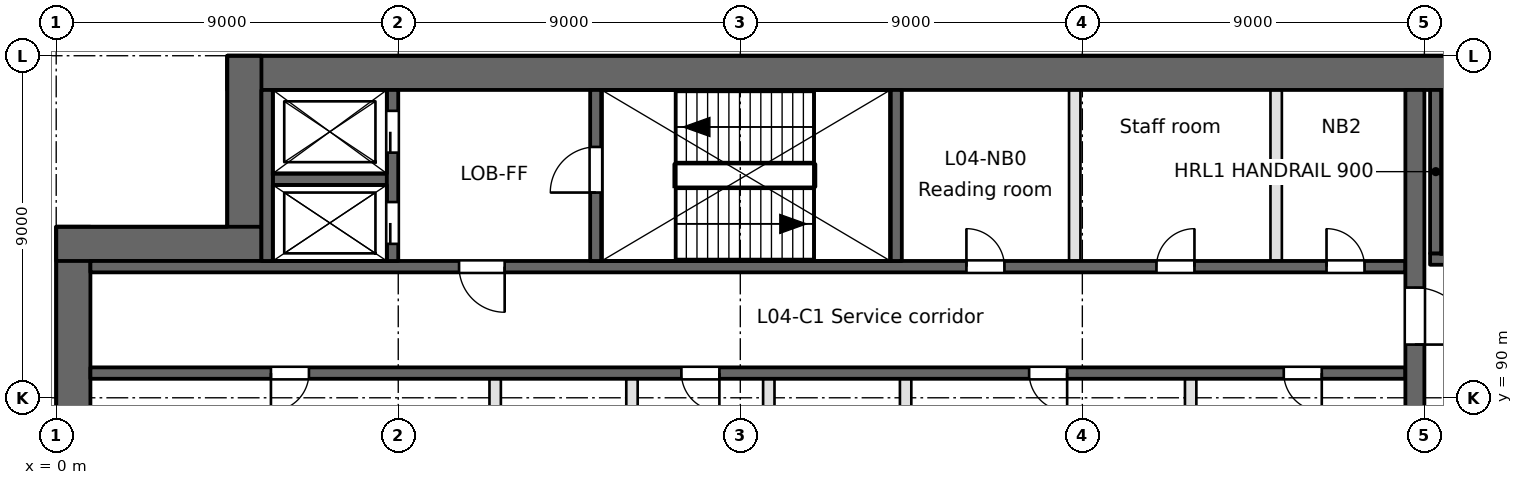
"""IFC4 building model, lengths in metres.
Left out: names, types, materials, properties, quantities, classifications, styles, units other than length and angle.
Written with IfcOpenShell. Run it as: python <this file> out.ifc"""

import sys

from ifc_helpers import new_model, si_unit, direction, frame, frame_2d, origin, place, context, subcontext, project, spatial, rectangle, extrude, element, fill, save


model = new_model("IFC4")
c1 = context("Model", 3, precision=1e-05, world=origin(), true_north=direction((0.0, 1.0)))
c2 = subcontext(c1, "Body", "Model", "MODEL_VIEW")
j1 = project(units=[si_unit("LENGTHUNIT", "METRE"), si_unit("PLANEANGLEUNIT", "RADIAN")], contexts=[c1])
p1 = place(None, origin())
s1 = spatial("IfcSite", under=j1, at=p1, CompositionType="ELEMENT")
p2 = place(p1, origin())
s2 = spatial("IfcBuilding", under=s1, at=p2, CompositionType="ELEMENT")
p3 = place(p2, frame((0.0, 0.0, 21.6)))
s3 = spatial("IfcBuildingStorey", under=s2, at=p3, CompositionType="ELEMENT", Elevation=21.6)
p4 = place(p3, frame((0.45, 94.5, 0.0), z_axis=(0.0, 0.0, 1.0), x_axis=(0.0, -1.0, 0.0)))
e1 = element("IfcWall", 1, at=p4, inside=s3, PredefinedType="SHEAR", context=c2, shape_type="SweptSolid", body=[
    extrude(rectangle(XDim=66.085, YDim=0.9, at=frame_2d((33.042, 0.0))), origin(), (0.0, 0.0, 1.0), 4.8),
])
p5 = place(p3, frame((94.5, 98.55, 0.0), z_axis=(0.0, 0.0, 1.0), x_axis=(-1.0, 0.0, 0.0)))
e2 = element("IfcWall", 2, at=p5, inside=s3, PredefinedType="SHEAR", context=c2, shape_type="SweptSolid", body=[
    extrude(rectangle(XDim=90.0, YDim=0.9, at=frame_2d((45.0, 0.0))), origin(), (0.0, 0.0, 1.0), 4.8),
])
for number, where, z_axis, x_axis in (
    (3, (4.95, 99.0, 0.0), (0.0, 0.0, 1.0), (0.0, -1.0, 0.0)),
    (4, (5.4, 94.05, 0.0), (0.0, 0.0, 1.0), (-1.0, 0.0, 0.0)),
):
    element("IfcWall", number, at=place(p3, frame(where, z_axis=z_axis, x_axis=x_axis)), inside=s3, PredefinedType="SHEAR", context=c2, shape_type="SweptSolid", body=[
        extrude(rectangle(XDim=5.4, YDim=0.9, at=frame_2d((2.7, 0.0))), origin(), (0.0, 0.0, 1.0), 4.8),
    ])
p6 = place(p3, frame((0.9, 90.65, -0.35), z_axis=(0.0, 0.0, 1.0), x_axis=(1.0, 0.0, 0.0)))
e5 = element("IfcWall", 5, at=p6, inside=s3, PredefinedType="SOLIDWALL", context=c2, shape_type="SweptSolid", body=[
    extrude(rectangle(XDim=34.6, YDim=0.3, at=frame_2d((17.3, 0.0))), origin(), (0.0, 0.0, 1.0), 4.8),
])
p7 = place(p6, frame((4.75, 0.0, 0.35)))
e6 = element("IfcOpeningElement", 6, at=p7, cuts=e5, PredefinedType="OPENING", context=c2, shape_type="SweptSolid", body=[
    extrude(rectangle(XDim=1.0, YDim=2.1, at=frame_2d((0.5, 1.05))), frame((0.0, 0.15, 0.0), z_axis=(0.0, -1.0, 0.0), x_axis=(1.0, 0.0, 0.0)), (0.0, 0.0, 1.0), 0.3),
])
p8 = place(p6, frame((24.7, 0.0, 0.35)))
e7 = element("IfcOpeningElement", 7, at=p8, cuts=e5, PredefinedType="OPENING", context=c2, shape_type="SweptSolid", body=[
    extrude(rectangle(XDim=1.0, YDim=2.1, at=frame_2d((0.5, 1.05))), frame((0.0, 0.15, 0.0), z_axis=(0.0, -1.0, 0.0), x_axis=(1.0, 0.0, 0.0)), (0.0, 0.0, 1.0), 0.3),
])
p9 = place(p6, frame((15.55, 0.0, 0.35)))
e8 = element("IfcOpeningElement", 8, at=p9, cuts=e5, PredefinedType="OPENING", context=c2, shape_type="SweptSolid", body=[
    extrude(rectangle(XDim=1.0, YDim=2.1, at=frame_2d((0.5, 1.05))), frame((0.0, 0.15, 0.0), z_axis=(0.0, -1.0, 0.0), x_axis=(1.0, 0.0, 0.0)), (0.0, 0.0, 1.0), 0.3),
])
p10 = place(p6, frame((31.4, 0.0, 0.35)))
e9 = element("IfcOpeningElement", 9, at=p10, cuts=e5, PredefinedType="OPENING", context=c2, shape_type="SweptSolid", body=[
    extrude(rectangle(XDim=1.0, YDim=2.1, at=frame_2d((0.5, 1.05))), frame((0.0, 0.15, 0.0), z_axis=(0.0, -1.0, 0.0), x_axis=(1.0, 0.0, 0.0)), (0.0, 0.0, 1.0), 0.3),
])
p11 = place(p3, frame((0.9, 93.45, -0.35), z_axis=(0.0, 0.0, 1.0), x_axis=(1.0, 0.0, 0.0)))
e10 = element("IfcWall", 10, at=p11, inside=s3, PredefinedType="SOLIDWALL", context=c2, shape_type="SweptSolid", body=[
    extrude(rectangle(XDim=34.6, YDim=0.3, at=frame_2d((17.3, 0.0))), origin(), (0.0, 0.0, 1.0), 4.8),
])
p12 = place(p11, frame((9.7, 0.0, 0.35)))
e11 = element("IfcOpeningElement", 11, at=p12, cuts=e10, PredefinedType="OPENING", context=c2, shape_type="SweptSolid", body=[
    extrude(rectangle(XDim=1.2, YDim=2.1, at=frame_2d((0.6, 1.05))), frame((0.0, 0.15, 0.0), z_axis=(0.0, -1.0, 0.0), x_axis=(1.0, 0.0, 0.0)), (0.0, 0.0, 1.0), 0.3),
])
p13 = place(p11, frame((23.05, 0.0, 0.35)))
e12 = element("IfcOpeningElement", 12, at=p13, cuts=e10, PredefinedType="OPENING", context=c2, shape_type="SweptSolid", body=[
    extrude(rectangle(XDim=1.0, YDim=2.1, at=frame_2d((0.5, 1.05))), frame((0.0, 0.15, 0.0), z_axis=(0.0, -1.0, 0.0), x_axis=(1.0, 0.0, 0.0)), (0.0, 0.0, 1.0), 0.3),
])
p14 = place(p11, frame((28.05, 0.0, 0.35)))
e13 = element("IfcOpeningElement", 13, at=p14, cuts=e10, PredefinedType="OPENING", context=c2, shape_type="SweptSolid", body=[
    extrude(rectangle(XDim=1.0, YDim=2.1, at=frame_2d((0.5, 1.05))), frame((0.0, 0.15, 0.0), z_axis=(0.0, -1.0, 0.0), x_axis=(1.0, 0.0, 0.0)), (0.0, 0.0, 1.0), 0.3),
])
p15 = place(p11, frame((32.525, 0.0, 0.35)))
e14 = element("IfcOpeningElement", 14, at=p15, cuts=e10, PredefinedType="OPENING", context=c2, shape_type="SweptSolid", body=[
    extrude(rectangle(XDim=1.0, YDim=2.1, at=frame_2d((0.5, 1.05))), frame((0.0, 0.15, 0.0), z_axis=(0.0, -1.0, 0.0), x_axis=(1.0, 0.0, 0.0)), (0.0, 0.0, 1.0), 0.3),
])
p16 = place(p3, frame((36.15, 93.65, -0.35), z_axis=(0.0, 0.0, 1.0), x_axis=(1.0, 0.0, 0.0)))
e15 = element("IfcWall", 15, at=p16, inside=s3, PredefinedType="SOLIDWALL", context=c2, shape_type="SweptSolid", body=[
    extrude(rectangle(XDim=8.2, YDim=0.3, at=frame_2d((4.1, 0.0))), origin(), (0.0, 0.0, 1.0), 4.8),
])
p17 = place(p16, frame((0.7, 0.0, 0.35)))
e16 = element("IfcOpeningElement", 16, at=p17, cuts=e15, PredefinedType="OPENING", context=c2, shape_type="SweptSolid", body=[
    extrude(rectangle(XDim=1.2, YDim=2.1, at=frame_2d((0.6, 1.05))), frame((0.0, 0.15, 0.0), z_axis=(0.0, -1.0, 0.0), x_axis=(1.0, 0.0, 0.0)), (0.0, 0.0, 1.0), 0.3),
])
p18 = place(p3, frame((5.7, 95.75, -0.35), z_axis=(0.0, 0.0, 1.0), x_axis=(1.0, 0.0, 0.0)))
e17 = element("IfcWall", 17, at=p18, inside=s3, PredefinedType="SOLIDWALL", context=c2, shape_type="SweptSolid", body=[
    extrude(rectangle(XDim=3.0, YDim=0.3, at=frame_2d((1.5, 0.0))), origin(), (0.0, 0.0, 1.0), 4.8),
])
p19 = place(p3, frame((5.55, 93.6, -0.35), z_axis=(0.0, 0.0, 1.0), x_axis=(0.0, 1.0, 0.0)))
e18 = element("IfcWall", 18, at=p19, inside=s3, PredefinedType="SOLIDWALL", context=c2, shape_type="SweptSolid", body=[
    extrude(rectangle(XDim=4.5, YDim=0.3, at=frame_2d((2.25, 0.0))), origin(), (0.0, 0.0, 1.0), 4.8),
])
p20 = place(p3, frame((8.85, 93.6, -0.35), z_axis=(0.0, 0.0, 1.0), x_axis=(0.0, 1.0, 0.0)))
e19 = element("IfcWall", 19, at=p20, inside=s3, PredefinedType="SOLIDWALL", context=c2, shape_type="SweptSolid", body=[
    extrude(rectangle(XDim=4.5, YDim=0.3, at=frame_2d((2.25, 0.0))), origin(), (0.0, 0.0, 1.0), 4.8),
])
p21 = place(p20, frame((0.45, 0.0, 0.35)))
e20 = element("IfcOpeningElement", 20, at=p21, cuts=e19, PredefinedType="OPENING", context=c2, shape_type="SweptSolid", body=[
    extrude(rectangle(XDim=1.1, YDim=2.1, at=frame_2d((0.55, 1.05))), frame((0.0, 0.15, 0.0), z_axis=(0.0, -1.0, 0.0), x_axis=(1.0, 0.0, 0.0)), (0.0, 0.0, 1.0), 0.3),
])
p22 = place(p20, frame((2.85, 0.0, 0.35)))
e21 = element("IfcOpeningElement", 21, at=p22, cuts=e19, PredefinedType="OPENING", context=c2, shape_type="SweptSolid", body=[
    extrude(rectangle(XDim=1.1, YDim=2.1, at=frame_2d((0.55, 1.05))), frame((0.0, 0.15, 0.0), z_axis=(0.0, -1.0, 0.0), x_axis=(1.0, 0.0, 0.0)), (0.0, 0.0, 1.0), 0.3),
])
p23 = place(p3, frame((11.55, 87.95, 0.0), z_axis=(0.0, 0.0, 1.0), x_axis=(0.0, 1.0, 0.0)))
e22 = element("IfcWall", 22, at=p23, inside=s3, PredefinedType="PARTITIONING", context=c2, shape_type="SweptSolid", body=[
    extrude(rectangle(XDim=2.55, YDim=0.3, at=frame_2d((1.275, 0.0))), origin(), (0.0, 0.0, 1.0), 4.45),
])
p24 = place(p3, frame((14.2, 93.6, -0.35), z_axis=(0.0, 0.0, 1.0), x_axis=(0.0, 1.0, 0.0)))
e23 = element("IfcWall", 23, at=p24, inside=s3, PredefinedType="SOLIDWALL", context=c2, shape_type="SweptSolid", body=[
    extrude(rectangle(XDim=4.5, YDim=0.3, at=frame_2d((2.25, 0.0))), origin(), (0.0, 0.0, 1.0), 4.8),
])
p25 = place(p24, frame((1.8, 0.0, 0.35)))
e24 = element("IfcOpeningElement", 24, at=p25, cuts=e23, PredefinedType="OPENING", context=c2, shape_type="SweptSolid", body=[
    extrude(rectangle(XDim=1.2, YDim=2.1, at=frame_2d((0.6, 1.05))), frame((0.0, 0.15, 0.0), z_axis=(0.0, -1.0, 0.0), x_axis=(1.0, 0.0, 0.0)), (0.0, 0.0, 1.0), 0.3),
])
for number, where, z_axis, x_axis in (
    (25, (15.15, 77.55, 0.0), (0.0, 0.0, 1.0), (0.0, 1.0, 0.0)),
    (26, (18.75, 77.55, 0.0), (0.0, 0.0, 1.0), (0.0, 1.0, 0.0)),
):
    element("IfcWall", number, at=place(p3, frame(where, z_axis=z_axis, x_axis=x_axis)), inside=s3, PredefinedType="PARTITIONING", context=c2, shape_type="SweptSolid", body=[
        extrude(rectangle(XDim=12.95, YDim=0.3, at=frame_2d((6.475, 0.0))), origin(), (0.0, 0.0, 1.0), 4.45),
    ])
p26 = place(p3, frame((22.1, 93.6, -0.35), z_axis=(0.0, 0.0, 1.0), x_axis=(0.0, 1.0, 0.0)))
e27 = element("IfcWall", 27, at=p26, inside=s3, PredefinedType="SOLIDWALL", context=c2, shape_type="SweptSolid", body=[
    extrude(rectangle(XDim=4.5, YDim=0.3, at=frame_2d((2.25, 0.0))), origin(), (0.0, 0.0, 1.0), 4.8),
])
p27 = place(p3, frame((22.35, 87.95, 0.0), z_axis=(0.0, 0.0, 1.0), x_axis=(0.0, 1.0, 0.0)))
e28 = element("IfcWall", 28, at=p27, inside=s3, PredefinedType="PARTITIONING", context=c2, shape_type="SweptSolid", body=[
    extrude(rectangle(XDim=2.55, YDim=0.3, at=frame_2d((1.275, 0.0))), origin(), (0.0, 0.0, 1.0), 4.45),
])
p28 = place(p3, frame((26.8, 93.6, 0.0), z_axis=(0.0, 0.0, 1.0), x_axis=(0.0, 1.0, 0.0)))
e29 = element("IfcWall", 29, at=p28, inside=s3, PredefinedType="PARTITIONING", context=c2, shape_type="SweptSolid", body=[
    extrude(rectangle(XDim=4.5, YDim=0.3, at=frame_2d((2.25, 0.0))), origin(), (0.0, 0.0, 1.0), 4.45),
])
p29 = place(p3, frame((29.85, 87.95, 0.0), z_axis=(0.0, 0.0, 1.0), x_axis=(0.0, 1.0, 0.0)))
e30 = element("IfcWall", 30, at=p29, inside=s3, PredefinedType="PARTITIONING", context=c2, shape_type="SweptSolid", body=[
    extrude(rectangle(XDim=2.55, YDim=0.3, at=frame_2d((1.275, 0.0))), origin(), (0.0, 0.0, 1.0), 4.45),
])
p30 = place(p3, frame((32.1, 93.6, 0.0), z_axis=(0.0, 0.0, 1.0), x_axis=(0.0, 1.0, 0.0)))
e31 = element("IfcWall", 31, at=p30, inside=s3, PredefinedType="PARTITIONING", context=c2, shape_type="SweptSolid", body=[
    extrude(rectangle(XDim=4.5, YDim=0.3, at=frame_2d((2.25, 0.0))), origin(), (0.0, 0.0, 1.0), 4.45),
])
p31 = place(p3, frame((35.75, 63.5, -0.35), z_axis=(0.0, 0.0, 1.0), x_axis=(0.0, 1.0, 0.0)))
e32 = element("IfcWall", 32, at=p31, inside=s3, PredefinedType="SOLIDWALL", context=c2, shape_type="SweptSolid", body=[
    extrude(rectangle(XDim=34.6, YDim=0.5, at=frame_2d((17.3, 0.0))), origin(), (0.0, 0.0, 1.0), 4.8),
])
p32 = place(p31, frame((9.7, 0.0, 0.35)))
e33 = element("IfcOpeningElement", 33, at=p32, cuts=e32, PredefinedType="OPENING", context=c2, shape_type="SweptSolid", body=[
    extrude(rectangle(XDim=2.4, YDim=2.1, at=frame_2d((1.2, 1.05))), frame((0.0, 0.25, 0.0), z_axis=(0.0, -1.0, 0.0), x_axis=(1.0, 0.0, 0.0)), (0.0, 0.0, 1.0), 0.5),
])
p33 = place(p31, frame((27.9, 0.0, 0.35)))
e34 = element("IfcOpeningElement", 34, at=p33, cuts=e32, PredefinedType="OPENING", context=c2, shape_type="SweptSolid", body=[
    extrude(rectangle(XDim=1.5, YDim=2.1, at=frame_2d((0.75, 1.05))), frame((0.0, 0.25, 0.0), z_axis=(0.0, -1.0, 0.0), x_axis=(1.0, 0.0, 0.0)), (0.0, 0.0, 1.0), 0.5),
])
p34 = place(p31, frame((1.5, 0.0, 0.35)))
e35 = element("IfcOpeningElement", 35, at=p34, cuts=e32, PredefinedType="OPENING", context=c2, shape_type="SweptSolid", body=[
    extrude(rectangle(XDim=1.2, YDim=2.1, at=frame_2d((0.6, 1.05))), frame((0.0, 0.25, 0.0), z_axis=(0.0, -1.0, 0.0), x_axis=(1.0, 0.0, 0.0)), (0.0, 0.0, 1.0), 0.5),
])
p35 = place(p3, frame((36.3, 93.8, -0.35), z_axis=(0.0, 0.0, 1.0), x_axis=(0.0, 1.0, 0.0)))
e36 = element("IfcWall", 36, at=p35, inside=s3, PredefinedType="SOLIDWALL", context=c2, shape_type="SweptSolid", body=[
    extrude(rectangle(XDim=4.3, YDim=0.3, at=frame_2d((2.15, 0.0))), origin(), (0.0, 0.0, 1.0), 4.8),
])
p36 = place(p21, origin())
e37 = element("IfcDoor", 37, at=p36, inside=s3, OperationType="SLIDING_TO_RIGHT", PredefinedType="DOOR", context=c2, shape_type="SweptSolid", body=[
    extrude(rectangle(XDim=1.1, YDim=2.1, at=frame_2d((0.55, 1.05))), frame((0.0, 0.025, 0.0), z_axis=(0.0, -1.0, 0.0), x_axis=(1.0, 0.0, 0.0)), (0.0, 0.0, 1.0), 0.05),
])
fill(e20, e37)
p37 = place(p22, origin())
e38 = element("IfcDoor", 38, at=p37, inside=s3, OperationType="SLIDING_TO_LEFT", PredefinedType="DOOR", context=c2, shape_type="SweptSolid", body=[
    extrude(rectangle(XDim=1.1, YDim=2.1, at=frame_2d((0.55, 1.05))), frame((0.0, 0.025, 0.0), z_axis=(0.0, -1.0, 0.0), x_axis=(1.0, 0.0, 0.0)), (0.0, 0.0, 1.0), 0.05),
])
fill(e21, e38)
p38 = place(p12, frame((1.2, 0.0, 0.0), z_axis=(0.0, 0.0, 1.0), x_axis=(-1.0, 0.0, 0.0)))
e39 = element("IfcDoor", 39, at=p38, inside=s3, OperationType="SINGLE_SWING_LEFT", PredefinedType="DOOR", context=c2, shape_type="SweptSolid", body=[
    extrude(rectangle(XDim=1.2, YDim=2.1, at=frame_2d((0.6, 1.05))), frame((0.0, 0.025, 0.0), z_axis=(0.0, -1.0, 0.0), x_axis=(1.0, 0.0, 0.0)), (0.0, 0.0, 1.0), 0.05),
])
fill(e11, e39)
p39 = place(p33, frame((1.5, 0.0, 0.0), z_axis=(0.0, 0.0, 1.0), x_axis=(-1.0, 0.0, 0.0)))
e40 = element("IfcDoor", 40, at=p39, inside=s3, OperationType="SINGLE_SWING_RIGHT", PredefinedType="DOOR", context=c2, shape_type="SweptSolid", body=[
    extrude(rectangle(XDim=1.5, YDim=2.1, at=frame_2d((0.75, 1.05))), frame((0.0, 0.025, 0.0), z_axis=(0.0, -1.0, 0.0), x_axis=(1.0, 0.0, 0.0)), (0.0, 0.0, 1.0), 0.05),
])
fill(e34, e40)
p40 = place(p25, origin())
e41 = element("IfcDoor", 41, at=p40, inside=s3, OperationType="SINGLE_SWING_LEFT", PredefinedType="DOOR", context=c2, shape_type="SweptSolid", body=[
    extrude(rectangle(XDim=1.2, YDim=2.1, at=frame_2d((0.6, 1.05))), frame((0.0, 0.025, 0.0), z_axis=(0.0, -1.0, 0.0), x_axis=(1.0, 0.0, 0.0)), (0.0, 0.0, 1.0), 0.05),
])
fill(e24, e41)
p41 = place(p7, frame((1.0, 0.0, 0.0), z_axis=(0.0, 0.0, 1.0), x_axis=(-1.0, 0.0, 0.0)))
e42 = element("IfcDoor", 42, at=p41, inside=s3, OperationType="SINGLE_SWING_RIGHT", PredefinedType="DOOR", context=c2, shape_type="SweptSolid", body=[
    extrude(rectangle(XDim=1.0, YDim=2.1, at=frame_2d((0.5, 1.05))), frame((0.0, 0.025, 0.0), z_axis=(0.0, -1.0, 0.0), x_axis=(1.0, 0.0, 0.0)), (0.0, 0.0, 1.0), 0.05),
])
fill(e6, e42)
p42 = place(p8, frame((1.0, 0.0, 0.0), z_axis=(0.0, 0.0, 1.0), x_axis=(-1.0, 0.0, 0.0)))
e43 = element("IfcDoor", 43, at=p42, inside=s3, OperationType="SINGLE_SWING_LEFT", PredefinedType="DOOR", context=c2, shape_type="SweptSolid", body=[
    extrude(rectangle(XDim=1.0, YDim=2.1, at=frame_2d((0.5, 1.05))), frame((0.0, 0.025, 0.0), z_axis=(0.0, -1.0, 0.0), x_axis=(1.0, 0.0, 0.0)), (0.0, 0.0, 1.0), 0.05),
])
fill(e7, e43)
p43 = place(p9, frame((1.0, 0.0, 0.0), z_axis=(0.0, 0.0, 1.0), x_axis=(-1.0, 0.0, 0.0)))
e44 = element("IfcDoor", 44, at=p43, inside=s3, OperationType="SINGLE_SWING_LEFT", PredefinedType="DOOR", context=c2, shape_type="SweptSolid", body=[
    extrude(rectangle(XDim=1.0, YDim=2.1, at=frame_2d((0.5, 1.05))), frame((0.0, 0.025, 0.0), z_axis=(0.0, -1.0, 0.0), x_axis=(1.0, 0.0, 0.0)), (0.0, 0.0, 1.0), 0.05),
])
fill(e8, e44)
p44 = place(p10, frame((1.0, 0.0, 0.0), z_axis=(0.0, 0.0, 1.0), x_axis=(-1.0, 0.0, 0.0)))
e45 = element("IfcDoor", 45, at=p44, inside=s3, OperationType="SINGLE_SWING_LEFT", PredefinedType="DOOR", context=c2, shape_type="SweptSolid", body=[
    extrude(rectangle(XDim=1.0, YDim=2.1, at=frame_2d((0.5, 1.05))), frame((0.0, 0.025, 0.0), z_axis=(0.0, -1.0, 0.0), x_axis=(1.0, 0.0, 0.0)), (0.0, 0.0, 1.0), 0.05),
])
fill(e9, e45)
p45 = place(p13, origin())
e46 = element("IfcDoor", 46, at=p45, inside=s3, OperationType="SINGLE_SWING_LEFT", PredefinedType="DOOR", context=c2, shape_type="SweptSolid", body=[
    extrude(rectangle(XDim=1.0, YDim=2.1, at=frame_2d((0.5, 1.05))), frame((0.0, 0.025, 0.0), z_axis=(0.0, -1.0, 0.0), x_axis=(1.0, 0.0, 0.0)), (0.0, 0.0, 1.0), 0.05),
])
fill(e12, e46)
p46 = place(p14, origin())
e47 = element("IfcDoor", 47, at=p46, inside=s3, OperationType="SINGLE_SWING_RIGHT", PredefinedType="DOOR", context=c2, shape_type="SweptSolid", body=[
    extrude(rectangle(XDim=1.0, YDim=2.1, at=frame_2d((0.5, 1.05))), frame((0.0, 0.025, 0.0), z_axis=(0.0, -1.0, 0.0), x_axis=(1.0, 0.0, 0.0)), (0.0, 0.0, 1.0), 0.05),
])
fill(e13, e47)
p47 = place(p15, origin())
e48 = element("IfcDoor", 48, at=p47, inside=s3, OperationType="SINGLE_SWING_LEFT", PredefinedType="DOOR", context=c2, shape_type="SweptSolid", body=[
    extrude(rectangle(XDim=1.0, YDim=2.1, at=frame_2d((0.5, 1.05))), frame((0.0, 0.025, 0.0), z_axis=(0.0, -1.0, 0.0), x_axis=(1.0, 0.0, 0.0)), (0.0, 0.0, 1.0), 0.05),
])
fill(e14, e48)
save(model, sys.argv[1])
